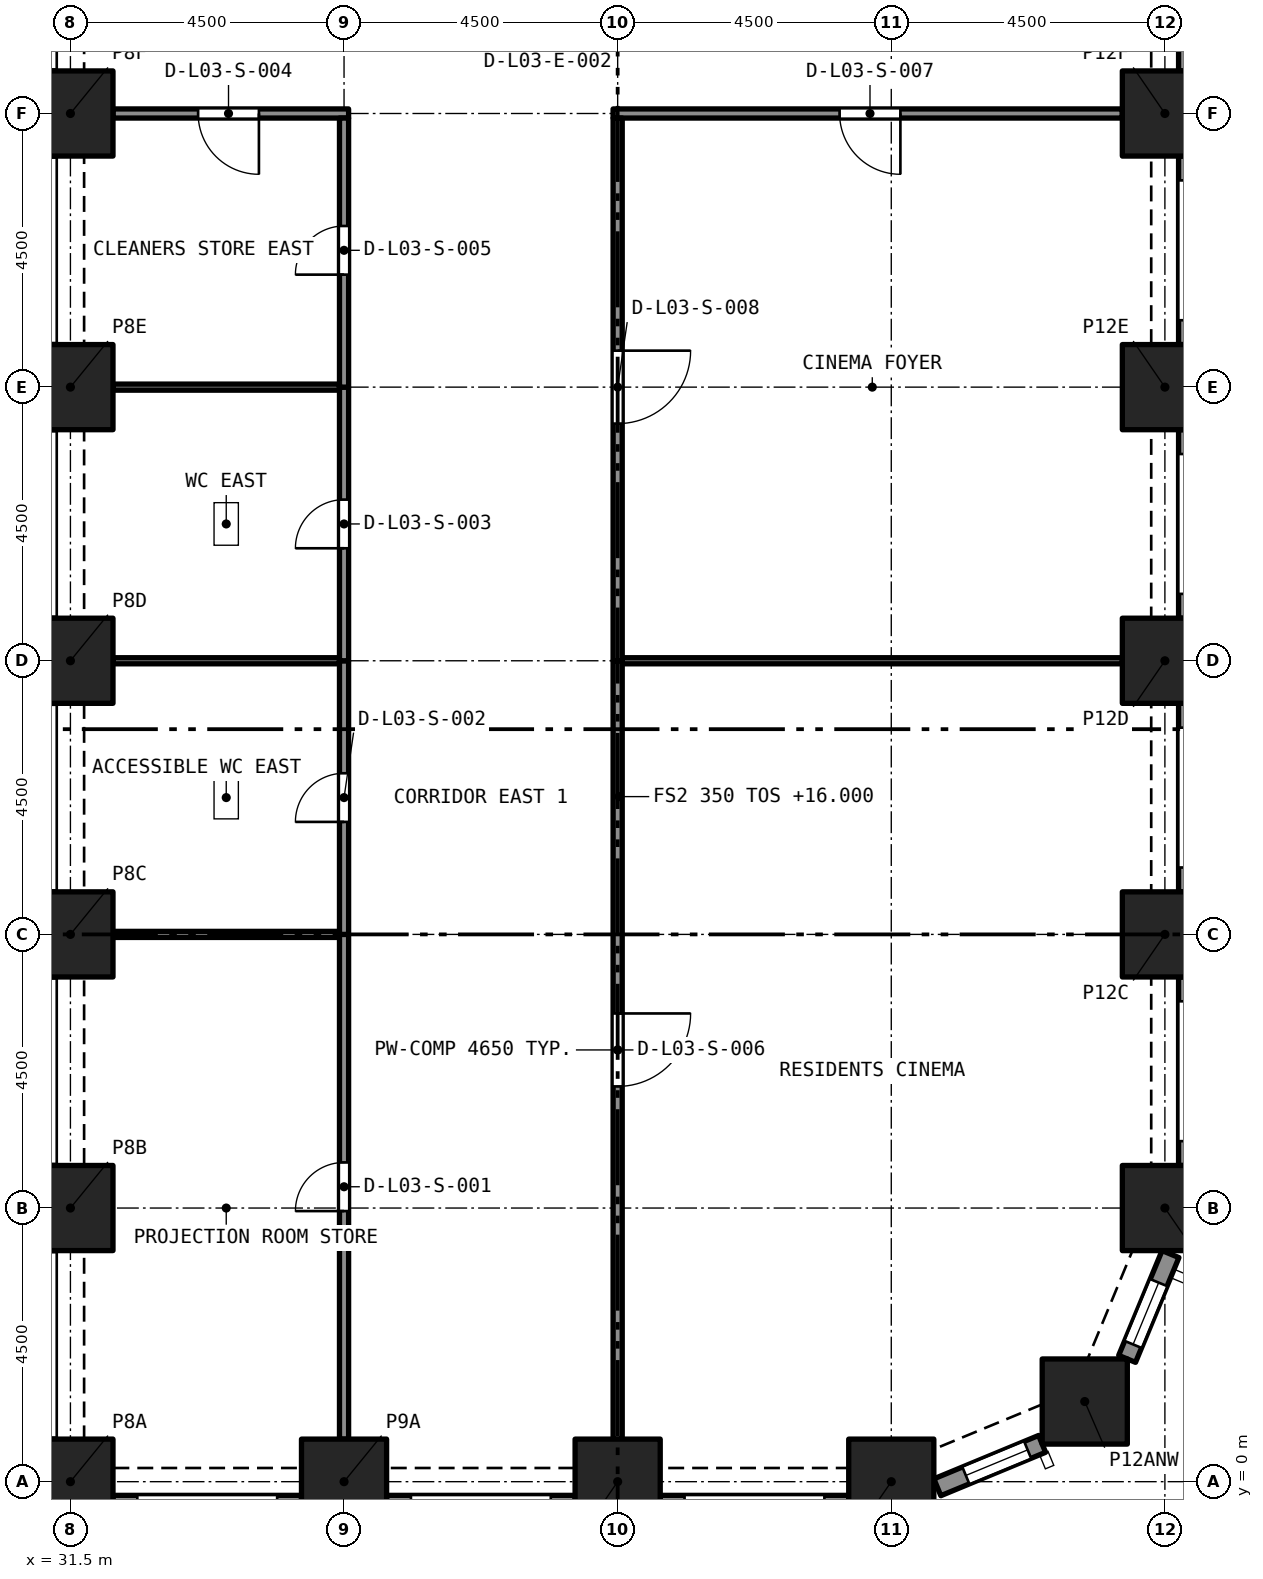
"""IFC4 building model, lengths in metres.
Left out: names, types, materials, properties, quantities, classifications, styles, units other than length and angle.
Written with IfcOpenShell. Run it as: python <this file> out.ifc"""

import sys

from ifc_helpers import new_model, si_unit, direction, frame, frame_2d, origin, origin_2d, place, context, subcontext, project, spatial, rectangle, extrude, element, fill, save


model = new_model("IFC4")
c1 = context("Model", 3, precision=1e-05, world=origin(), true_north=direction((0.0, 1.0)))
c2 = subcontext(c1, "Body", "Model", "MODEL_VIEW")
j1 = project(units=[si_unit("LENGTHUNIT", "METRE"), si_unit("PLANEANGLEUNIT", "RADIAN")], contexts=[c1])
p1 = place(None, origin())
s1 = spatial("IfcSite", under=j1, at=p1, CompositionType="ELEMENT")
p2 = place(p1, origin())
s2 = spatial("IfcBuilding", under=s1, at=p2, CompositionType="ELEMENT")
p3 = place(p2, frame((0.0, 0.0, 16.0)))
s3 = spatial("IfcBuildingStorey", under=s2, at=p3, CompositionType="ELEMENT", Elevation=16.0)
for number, where, z_axis, x_axis in (
    (1, (31.5, 0.0, 0.0), (0.0, 0.0, 1.0), (1.0, 0.0, 0.0)),
    (2, (36.0, 0.0, 0.0), (0.0, 0.0, 1.0), (1.0, 0.0, 0.0)),
    (3, (40.5, 0.0, 0.0), (0.0, 0.0, 1.0), (1.0, 0.0, 0.0)),
    (4, (45.0, 0.0, 0.0), (0.0, 0.0, 1.0), (1.0, 0.0, 0.0)),
    (5, (48.182, 1.318, 0.0), (0.0, 0.0, 1.0), (1.0, 0.0, 0.0)),
    (6, (31.5, 4.5, 0.0), (0.0, 0.0, 1.0), (1.0, 0.0, 0.0)),
    (7, (49.5, 4.5, 0.0), (0.0, 0.0, 1.0), (1.0, 0.0, 0.0)),
    (8, (31.5, 9.0, 0.0), (0.0, 0.0, 1.0), (1.0, 0.0, 0.0)),
    (9, (49.5, 9.0, 0.0), (0.0, 0.0, 1.0), (1.0, 0.0, 0.0)),
    (10, (31.5, 13.5, 0.0), (0.0, 0.0, 1.0), (1.0, 0.0, 0.0)),
    (11, (49.5, 13.5, 0.0), (0.0, 0.0, 1.0), (1.0, 0.0, 0.0)),
    (12, (31.5, 18.0, 0.0), (0.0, 0.0, 1.0), (1.0, 0.0, 0.0)),
    (13, (49.5, 18.0, 0.0), (0.0, 0.0, 1.0), (1.0, 0.0, 0.0)),
    (14, (31.5, 22.5, 0.0), (0.0, 0.0, 1.0), (1.0, 0.0, 0.0)),
    (15, (49.5, 22.5, 0.0), (0.0, 0.0, 1.0), (1.0, 0.0, 0.0)),
):
    element("IfcColumn", number, at=place(p3, frame(where, z_axis=z_axis, x_axis=x_axis)), inside=s3, PredefinedType="COLUMN", context=c2, shape_type="SweptSolid", body=[
        extrude(rectangle(XDim=1.4, YDim=1.4, at=origin_2d()), origin(), (0.0, 0.0, 1.0), 5.0),
    ])
p4 = place(p3, frame((35.3, -0.375, 0.0), z_axis=(0.0, 0.0, 1.0), x_axis=(-1.0, 0.0, 0.0)))
e16 = element("IfcWall", 16, at=p4, inside=s3, PredefinedType="SOLIDWALL", context=c2, shape_type="SweptSolid", body=[
    extrude(rectangle(XDim=3.1, YDim=0.3, at=frame_2d((1.55, 0.0))), origin(), (0.0, 0.0, 1.0), 5.0),
])
p5 = place(p4, frame((0.4, 0.0, 0.45)))
e17 = element("IfcOpeningElement", 17, at=p5, cuts=e16, PredefinedType="OPENING", context=c2, shape_type="SweptSolid", body=[
    extrude(rectangle(XDim=2.3, YDim=3.3, at=frame_2d((1.15, 1.65))), frame((0.0, 0.16, 0.0), z_axis=(0.0, -1.0, 0.0), x_axis=(1.0, 0.0, 0.0)), (0.0, 0.0, 1.0), 0.32),
])
p6 = place(p3, frame((39.8, -0.375, 0.0), z_axis=(0.0, 0.0, 1.0), x_axis=(-1.0, 0.0, 0.0)))
e18 = element("IfcWall", 18, at=p6, inside=s3, PredefinedType="SOLIDWALL", context=c2, shape_type="SweptSolid", body=[
    extrude(rectangle(XDim=3.1, YDim=0.3, at=frame_2d((1.55, 0.0))), origin(), (0.0, 0.0, 1.0), 5.0),
])
p7 = place(p6, frame((0.4, 0.0, 0.45)))
e19 = element("IfcOpeningElement", 19, at=p7, cuts=e18, PredefinedType="OPENING", context=c2, shape_type="SweptSolid", body=[
    extrude(rectangle(XDim=2.3, YDim=3.3, at=frame_2d((1.15, 1.65))), frame((0.0, 0.16, 0.0), z_axis=(0.0, -1.0, 0.0), x_axis=(1.0, 0.0, 0.0)), (0.0, 0.0, 1.0), 0.32),
])
p8 = place(p3, frame((44.3, -0.375, 0.0), z_axis=(0.0, 0.0, 1.0), x_axis=(-1.0, 0.0, 0.0)))
e20 = element("IfcWall", 20, at=p8, inside=s3, PredefinedType="SOLIDWALL", context=c2, shape_type="SweptSolid", body=[
    extrude(rectangle(XDim=3.1, YDim=0.3, at=frame_2d((1.55, 0.0))), origin(), (0.0, 0.0, 1.0), 5.0),
])
p9 = place(p8, frame((0.4, 0.0, 0.45)))
e21 = element("IfcOpeningElement", 21, at=p9, cuts=e20, PredefinedType="OPENING", context=c2, shape_type="SweptSolid", body=[
    extrude(rectangle(XDim=2.3, YDim=3.3, at=frame_2d((1.15, 1.65))), frame((0.0, 0.16, 0.0), z_axis=(0.0, -1.0, 0.0), x_axis=(1.0, 0.0, 0.0)), (0.0, 0.0, 1.0), 0.32),
])
p10 = place(p3, frame((47.48, 0.622, 0.0), z_axis=(0.0, 0.0, 1.0), x_axis=(-0.923903565336, -0.38262540684, 0.0)))
e22 = element("IfcWall", 22, at=p10, inside=s3, PredefinedType="SOLIDWALL", context=c2, shape_type="SweptSolid", body=[
    extrude(rectangle(XDim=1.865, YDim=0.3, at=frame_2d((0.933, 0.0))), origin(), (0.0, 0.0, 1.0), 5.0),
])
p11 = place(p10, frame((0.258, 0.0, 0.45)))
e23 = element("IfcOpeningElement", 23, at=p11, cuts=e22, PredefinedType="OPENING", context=c2, shape_type="SweptSolid", body=[
    extrude(rectangle(XDim=1.1, YDim=3.3, at=frame_2d((0.55, 1.65))), frame((0.0, 0.16, 0.0), z_axis=(0.0, -1.0, 0.0), x_axis=(1.0, 0.0, 0.0)), (0.0, 0.0, 1.0), 0.32),
])
p12 = place(p3, frame((49.592, 3.743, 0.0), z_axis=(0.0, 0.0, 1.0), x_axis=(-0.382737135771, -0.923857286003, 0.0)))
e24 = element("IfcWall", 24, at=p12, inside=s3, PredefinedType="SOLIDWALL", context=c2, shape_type="SweptSolid", body=[
    extrude(rectangle(XDim=1.865, YDim=0.3, at=frame_2d((0.933, 0.0))), origin(), (0.0, 0.0, 1.0), 5.0),
])
p13 = place(p12, frame((0.508, 0.0, 0.45)))
e25 = element("IfcOpeningElement", 25, at=p13, cuts=e24, PredefinedType="OPENING", context=c2, shape_type="SweptSolid", body=[
    extrude(rectangle(XDim=1.1, YDim=3.3, at=frame_2d((0.55, 1.65))), frame((0.0, 0.16, 0.0), z_axis=(0.0, -1.0, 0.0), x_axis=(1.0, 0.0, 0.0)), (0.0, 0.0, 1.0), 0.32),
])
p14 = place(p3, frame((49.875, 8.3, 0.0), z_axis=(0.0, 0.0, 1.0), x_axis=(0.0, -1.0, 0.0)))
e26 = element("IfcWall", 26, at=p14, inside=s3, PredefinedType="SOLIDWALL", context=c2, shape_type="SweptSolid", body=[
    extrude(rectangle(XDim=3.1, YDim=0.3, at=frame_2d((1.55, 0.0))), origin(), (0.0, 0.0, 1.0), 5.0),
])
p15 = place(p14, frame((0.4, 0.0, 0.45)))
e27 = element("IfcOpeningElement", 27, at=p15, cuts=e26, PredefinedType="OPENING", context=c2, shape_type="SweptSolid", body=[
    extrude(rectangle(XDim=2.3, YDim=3.3, at=frame_2d((1.15, 1.65))), frame((0.0, 0.16, 0.0), z_axis=(0.0, -1.0, 0.0), x_axis=(1.0, 0.0, 0.0)), (0.0, 0.0, 1.0), 0.32),
])
p16 = place(p3, frame((49.875, 12.8, 0.0), z_axis=(0.0, 0.0, 1.0), x_axis=(0.0, -1.0, 0.0)))
e28 = element("IfcWall", 28, at=p16, inside=s3, PredefinedType="SOLIDWALL", context=c2, shape_type="SweptSolid", body=[
    extrude(rectangle(XDim=3.1, YDim=0.3, at=frame_2d((1.55, 0.0))), origin(), (0.0, 0.0, 1.0), 5.0),
])
p17 = place(p16, frame((0.4, 0.0, 0.45)))
e29 = element("IfcOpeningElement", 29, at=p17, cuts=e28, PredefinedType="OPENING", context=c2, shape_type="SweptSolid", body=[
    extrude(rectangle(XDim=2.3, YDim=3.3, at=frame_2d((1.15, 1.65))), frame((0.0, 0.16, 0.0), z_axis=(0.0, -1.0, 0.0), x_axis=(1.0, 0.0, 0.0)), (0.0, 0.0, 1.0), 0.32),
])
p18 = place(p3, frame((49.875, 17.3, 0.0), z_axis=(0.0, 0.0, 1.0), x_axis=(0.0, -1.0, 0.0)))
e30 = element("IfcWall", 30, at=p18, inside=s3, PredefinedType="SOLIDWALL", context=c2, shape_type="SweptSolid", body=[
    extrude(rectangle(XDim=3.1, YDim=0.3, at=frame_2d((1.55, 0.0))), origin(), (0.0, 0.0, 1.0), 5.0),
])
p19 = place(p18, frame((0.4, 0.0, 0.45)))
e31 = element("IfcOpeningElement", 31, at=p19, cuts=e30, PredefinedType="OPENING", context=c2, shape_type="SweptSolid", body=[
    extrude(rectangle(XDim=2.3, YDim=3.3, at=frame_2d((1.15, 1.65))), frame((0.0, 0.16, 0.0), z_axis=(0.0, -1.0, 0.0), x_axis=(1.0, 0.0, 0.0)), (0.0, 0.0, 1.0), 0.32),
])
p20 = place(p3, frame((49.875, 21.8, 0.0), z_axis=(0.0, 0.0, 1.0), x_axis=(0.0, -1.0, 0.0)))
e32 = element("IfcWall", 32, at=p20, inside=s3, PredefinedType="SOLIDWALL", context=c2, shape_type="SweptSolid", body=[
    extrude(rectangle(XDim=3.1, YDim=0.3, at=frame_2d((1.55, 0.0))), origin(), (0.0, 0.0, 1.0), 5.0),
])
p21 = place(p20, frame((0.4, 0.0, 0.45)))
e33 = element("IfcOpeningElement", 33, at=p21, cuts=e32, PredefinedType="OPENING", context=c2, shape_type="SweptSolid", body=[
    extrude(rectangle(XDim=2.3, YDim=3.3, at=frame_2d((1.15, 1.65))), frame((0.0, 0.16, 0.0), z_axis=(0.0, -1.0, 0.0), x_axis=(1.0, 0.0, 0.0)), (0.0, 0.0, 1.0), 0.32),
])
p22 = place(p3, frame((49.875, 26.3, 0.0), z_axis=(0.0, 0.0, 1.0), x_axis=(0.0, -1.0, 0.0)))
e34 = element("IfcWall", 34, at=p22, inside=s3, PredefinedType="SOLIDWALL", context=c2, shape_type="SweptSolid", body=[
    extrude(rectangle(XDim=3.1, YDim=0.3, at=frame_2d((1.55, 0.0))), origin(), (0.0, 0.0, 1.0), 5.0),
])
p23 = place(p22, frame((0.4, 0.0, 0.45)))
e35 = element("IfcOpeningElement", 35, at=p23, cuts=e34, PredefinedType="OPENING", context=c2, shape_type="SweptSolid", body=[
    extrude(rectangle(XDim=2.3, YDim=3.3, at=frame_2d((1.15, 1.65))), frame((0.0, 0.16, 0.0), z_axis=(0.0, -1.0, 0.0), x_axis=(1.0, 0.0, 0.0)), (0.0, 0.0, 1.0), 0.32),
])
p24 = place(p3, frame((32.2, 9.0, 0.0), z_axis=(0.0, 0.0, 1.0), x_axis=(1.0, 0.0, 0.0)))
e36 = element("IfcWall", 36, at=p24, inside=s3, PredefinedType="PARTITIONING", context=c2, shape_type="SweptSolid", body=[
    extrude(rectangle(XDim=3.725, YDim=0.1, at=frame_2d((1.863, 0.0))), origin(), (0.0, 0.0, 1.0), 4.65),
])
p25 = place(p3, frame((36.0, 0.7, 0.0), z_axis=(0.0, 0.0, 1.0), x_axis=(0.0, 1.0, 0.0)))
e37 = element("IfcWall", 37, at=p25, inside=s3, PredefinedType="PARTITIONING", context=c2, shape_type="SweptSolid", body=[
    extrude(rectangle(XDim=8.3, YDim=0.15, at=frame_2d((4.15, 0.0))), origin(), (0.0, 0.0, 1.0), 4.65),
])
p26 = place(p25, frame((3.75, 0.0, 0.0)))
e38 = element("IfcOpeningElement", 38, at=p26, cuts=e37, PredefinedType="OPENING", context=c2, shape_type="SweptSolid", body=[
    extrude(rectangle(XDim=0.8, YDim=2.1, at=frame_2d((0.4, 1.05))), frame((0.0, 0.085, 0.0), z_axis=(0.0, -1.0, 0.0), x_axis=(1.0, 0.0, 0.0)), (0.0, 0.0, 1.0), 0.17),
])
p27 = place(p3, frame((32.2, 13.5, 0.0), z_axis=(0.0, 0.0, 1.0), x_axis=(1.0, 0.0, 0.0)))
e39 = element("IfcWall", 39, at=p27, inside=s3, PredefinedType="PARTITIONING", context=c2, shape_type="SweptSolid", body=[
    extrude(rectangle(XDim=3.725, YDim=0.1, at=frame_2d((1.863, 0.0))), origin(), (0.0, 0.0, 1.0), 4.65),
])
p28 = place(p3, frame((36.0, 9.0, 0.0), z_axis=(0.0, 0.0, 1.0), x_axis=(0.0, 1.0, 0.0)))
e40 = element("IfcWall", 40, at=p28, inside=s3, PredefinedType="PARTITIONING", context=c2, shape_type="SweptSolid", body=[
    extrude(rectangle(XDim=4.5, YDim=0.15, at=frame_2d((2.25, 0.0))), origin(), (0.0, 0.0, 1.0), 4.65),
])
p29 = place(p28, frame((1.85, 0.0, 0.0)))
e41 = element("IfcOpeningElement", 41, at=p29, cuts=e40, PredefinedType="OPENING", context=c2, shape_type="SweptSolid", body=[
    extrude(rectangle(XDim=0.8, YDim=2.1, at=frame_2d((0.4, 1.05))), frame((0.0, 0.085, 0.0), z_axis=(0.0, -1.0, 0.0), x_axis=(1.0, 0.0, 0.0)), (0.0, 0.0, 1.0), 0.17),
])
p30 = place(p3, frame((32.2, 18.0, 0.0), z_axis=(0.0, 0.0, 1.0), x_axis=(1.0, 0.0, 0.0)))
e42 = element("IfcWall", 42, at=p30, inside=s3, PredefinedType="PARTITIONING", context=c2, shape_type="SweptSolid", body=[
    extrude(rectangle(XDim=3.725, YDim=0.1, at=frame_2d((1.863, 0.0))), origin(), (0.0, 0.0, 1.0), 4.65),
])
p31 = place(p3, frame((36.0, 13.5, 0.0), z_axis=(0.0, 0.0, 1.0), x_axis=(0.0, 1.0, 0.0)))
e43 = element("IfcWall", 43, at=p31, inside=s3, PredefinedType="PARTITIONING", context=c2, shape_type="SweptSolid", body=[
    extrude(rectangle(XDim=4.5, YDim=0.15, at=frame_2d((2.25, 0.0))), origin(), (0.0, 0.0, 1.0), 4.65),
])
p32 = place(p31, frame((1.85, 0.0, 0.0)))
e44 = element("IfcOpeningElement", 44, at=p32, cuts=e43, PredefinedType="OPENING", context=c2, shape_type="SweptSolid", body=[
    extrude(rectangle(XDim=0.8, YDim=2.1, at=frame_2d((0.4, 1.05))), frame((0.0, 0.085, 0.0), z_axis=(0.0, -1.0, 0.0), x_axis=(1.0, 0.0, 0.0)), (0.0, 0.0, 1.0), 0.17),
])
p33 = place(p3, frame((36.075, 22.5, 0.0), z_axis=(0.0, 0.0, 1.0), x_axis=(-1.0, 0.0, 0.0)))
e45 = element("IfcWall", 45, at=p33, inside=s3, PredefinedType="PARTITIONING", context=c2, shape_type="SweptSolid", body=[
    extrude(rectangle(XDim=3.875, YDim=0.15, at=frame_2d((1.938, 0.0))), origin(), (0.0, 0.0, 1.0), 4.65),
])
p34 = place(p33, frame((1.475, 0.0, 0.0)))
e46 = element("IfcOpeningElement", 46, at=p34, cuts=e45, PredefinedType="OPENING", context=c2, shape_type="SweptSolid", body=[
    extrude(rectangle(XDim=1.0, YDim=2.1, at=frame_2d((0.5, 1.05))), frame((0.0, 0.085, 0.0), z_axis=(0.0, -1.0, 0.0), x_axis=(1.0, 0.0, 0.0)), (0.0, 0.0, 1.0), 0.17),
])
p35 = place(p3, frame((36.0, 18.0, 0.0), z_axis=(0.0, 0.0, 1.0), x_axis=(0.0, 1.0, 0.0)))
e47 = element("IfcWall", 47, at=p35, inside=s3, PredefinedType="PARTITIONING", context=c2, shape_type="SweptSolid", body=[
    extrude(rectangle(XDim=4.425, YDim=0.15, at=frame_2d((2.212, 0.0))), origin(), (0.0, 0.0, 1.0), 4.65),
])
p36 = place(p35, frame((1.85, 0.0, 0.0)))
e48 = element("IfcOpeningElement", 48, at=p36, cuts=e47, PredefinedType="OPENING", context=c2, shape_type="SweptSolid", body=[
    extrude(rectangle(XDim=0.8, YDim=2.1, at=frame_2d((0.4, 1.05))), frame((0.0, 0.085, 0.0), z_axis=(0.0, -1.0, 0.0), x_axis=(1.0, 0.0, 0.0)), (0.0, 0.0, 1.0), 0.17),
])
p37 = place(p3, frame((40.575, 13.5, 0.0), z_axis=(0.0, 0.0, 1.0), x_axis=(1.0, 0.0, 0.0)))
e49 = element("IfcWall", 49, at=p37, inside=s3, PredefinedType="PARTITIONING", context=c2, shape_type="SweptSolid", body=[
    extrude(rectangle(XDim=8.225, YDim=0.1, at=frame_2d((4.113, 0.0))), origin(), (0.0, 0.0, 1.0), 4.65),
])
p38 = place(p3, frame((40.5, 13.5, 0.0), z_axis=(0.0, 0.0, 1.0), x_axis=(0.0, -1.0, 0.0)))
e50 = element("IfcWall", 50, at=p38, inside=s3, PredefinedType="PARTITIONING", context=c2, shape_type="SweptSolid", body=[
    extrude(rectangle(XDim=12.8, YDim=0.15, at=frame_2d((6.4, 0.0))), origin(), (0.0, 0.0, 1.0), 4.65),
])
p39 = place(p38, frame((5.8, 0.0, 0.0)))
e51 = element("IfcOpeningElement", 51, at=p39, cuts=e50, PredefinedType="OPENING", context=c2, shape_type="SweptSolid", body=[
    extrude(rectangle(XDim=1.2, YDim=2.1, at=frame_2d((0.6, 1.05))), frame((0.0, 0.085, 0.0), z_axis=(0.0, -1.0, 0.0), x_axis=(1.0, 0.0, 0.0)), (0.0, 0.0, 1.0), 0.17),
])
p40 = place(p3, frame((48.8, 22.5, 0.0), z_axis=(0.0, 0.0, 1.0), x_axis=(-1.0, 0.0, 0.0)))
e52 = element("IfcWall", 52, at=p40, inside=s3, PredefinedType="PARTITIONING", context=c2, shape_type="SweptSolid", body=[
    extrude(rectangle(XDim=8.375, YDim=0.15, at=frame_2d((4.188, 0.0))), origin(), (0.0, 0.0, 1.0), 4.65),
])
p41 = place(p40, frame((3.65, 0.0, 0.0)))
e53 = element("IfcOpeningElement", 53, at=p41, cuts=e52, PredefinedType="OPENING", context=c2, shape_type="SweptSolid", body=[
    extrude(rectangle(XDim=1.0, YDim=2.1, at=frame_2d((0.5, 1.05))), frame((0.0, 0.085, 0.0), z_axis=(0.0, -1.0, 0.0), x_axis=(1.0, 0.0, 0.0)), (0.0, 0.0, 1.0), 0.17),
])
p42 = place(p3, frame((40.5, 22.425, 0.0), z_axis=(0.0, 0.0, 1.0), x_axis=(0.0, -1.0, 0.0)))
e54 = element("IfcWall", 54, at=p42, inside=s3, PredefinedType="PARTITIONING", context=c2, shape_type="SweptSolid", body=[
    extrude(rectangle(XDim=8.925, YDim=0.15, at=frame_2d((4.462, 0.0))), origin(), (0.0, 0.0, 1.0), 4.65),
])
p43 = place(p42, frame((3.825, 0.0, 0.0)))
e55 = element("IfcOpeningElement", 55, at=p43, cuts=e54, PredefinedType="OPENING", context=c2, shape_type="SweptSolid", body=[
    extrude(rectangle(XDim=1.2, YDim=2.1, at=frame_2d((0.6, 1.05))), frame((0.0, 0.085, 0.0), z_axis=(0.0, -1.0, 0.0), x_axis=(1.0, 0.0, 0.0)), (0.0, 0.0, 1.0), 0.17),
])
p44 = place(p11, origin())
e56 = element("IfcWindow", 56, at=p44, inside=s3, PartitioningType="SINGLE_PANEL", PredefinedType="WINDOW", context=c2, shape_type="SweptSolid", body=[
    extrude(rectangle(XDim=1.1, YDim=3.3, at=frame_2d((0.55, 1.65))), frame((0.0, 0.03, 0.0), z_axis=(0.0, -1.0, 0.0), x_axis=(1.0, 0.0, 0.0)), (0.0, 0.0, 1.0), 0.06),
])
fill(e23, e56)
p45 = place(p13, origin())
e57 = element("IfcWindow", 57, at=p45, inside=s3, PartitioningType="SINGLE_PANEL", PredefinedType="WINDOW", context=c2, shape_type="SweptSolid", body=[
    extrude(rectangle(XDim=1.1, YDim=3.3, at=frame_2d((0.55, 1.65))), frame((0.0, 0.03, 0.0), z_axis=(0.0, -1.0, 0.0), x_axis=(1.0, 0.0, 0.0)), (0.0, 0.0, 1.0), 0.06),
])
fill(e25, e57)
p46 = place(p26, origin())
e58 = element("IfcDoor", 58, at=p46, inside=s3, OperationType="SINGLE_SWING_LEFT", PredefinedType="DOOR", context=c2, shape_type="SweptSolid", body=[
    extrude(rectangle(XDim=0.8, YDim=2.1, at=frame_2d((0.4, 1.05))), frame((0.0, 0.025, 0.0), z_axis=(0.0, -1.0, 0.0), x_axis=(1.0, 0.0, 0.0)), (0.0, 0.0, 1.0), 0.05),
])
fill(e38, e58)
p47 = place(p29, origin())
e59 = element("IfcDoor", 59, at=p47, inside=s3, OperationType="SINGLE_SWING_RIGHT", PredefinedType="DOOR", context=c2, shape_type="SweptSolid", body=[
    extrude(rectangle(XDim=0.8, YDim=2.1, at=frame_2d((0.4, 1.05))), frame((0.0, 0.025, 0.0), z_axis=(0.0, -1.0, 0.0), x_axis=(1.0, 0.0, 0.0)), (0.0, 0.0, 1.0), 0.05),
])
fill(e41, e59)
p48 = place(p32, origin())
e60 = element("IfcDoor", 60, at=p48, inside=s3, OperationType="SINGLE_SWING_RIGHT", PredefinedType="DOOR", context=c2, shape_type="SweptSolid", body=[
    extrude(rectangle(XDim=0.8, YDim=2.1, at=frame_2d((0.4, 1.05))), frame((0.0, 0.025, 0.0), z_axis=(0.0, -1.0, 0.0), x_axis=(1.0, 0.0, 0.0)), (0.0, 0.0, 1.0), 0.05),
])
fill(e44, e60)
p49 = place(p34, origin())
e61 = element("IfcDoor", 61, at=p49, inside=s3, OperationType="SINGLE_SWING_RIGHT", PredefinedType="DOOR", context=c2, shape_type="SweptSolid", body=[
    extrude(rectangle(XDim=1.0, YDim=2.1, at=frame_2d((0.5, 1.05))), frame((0.0, 0.025, 0.0), z_axis=(0.0, -1.0, 0.0), x_axis=(1.0, 0.0, 0.0)), (0.0, 0.0, 1.0), 0.05),
])
fill(e46, e61)
p50 = place(p36, origin())
e62 = element("IfcDoor", 62, at=p50, inside=s3, OperationType="SINGLE_SWING_RIGHT", PredefinedType="DOOR", context=c2, shape_type="SweptSolid", body=[
    extrude(rectangle(XDim=0.8, YDim=2.1, at=frame_2d((0.4, 1.05))), frame((0.0, 0.025, 0.0), z_axis=(0.0, -1.0, 0.0), x_axis=(1.0, 0.0, 0.0)), (0.0, 0.0, 1.0), 0.05),
])
fill(e48, e62)
p51 = place(p39, origin())
e63 = element("IfcDoor", 63, at=p51, inside=s3, OperationType="SINGLE_SWING_RIGHT", PredefinedType="DOOR", context=c2, shape_type="SweptSolid", body=[
    extrude(rectangle(XDim=1.2, YDim=2.1, at=frame_2d((0.6, 1.05))), frame((0.0, 0.025, 0.0), z_axis=(0.0, -1.0, 0.0), x_axis=(1.0, 0.0, 0.0)), (0.0, 0.0, 1.0), 0.05),
])
fill(e51, e63)
p52 = place(p41, origin())
e64 = element("IfcDoor", 64, at=p52, inside=s3, OperationType="SINGLE_SWING_LEFT", PredefinedType="DOOR", context=c2, shape_type="SweptSolid", body=[
    extrude(rectangle(XDim=1.0, YDim=2.1, at=frame_2d((0.5, 1.05))), frame((0.0, 0.025, 0.0), z_axis=(0.0, -1.0, 0.0), x_axis=(1.0, 0.0, 0.0)), (0.0, 0.0, 1.0), 0.05),
])
fill(e53, e64)
p53 = place(p43, origin())
e65 = element("IfcDoor", 65, at=p53, inside=s3, OperationType="SINGLE_SWING_LEFT", PredefinedType="DOOR", context=c2, shape_type="SweptSolid", body=[
    extrude(rectangle(XDim=1.2, YDim=2.1, at=frame_2d((0.6, 1.05))), frame((0.0, 0.025, 0.0), z_axis=(0.0, -1.0, 0.0), x_axis=(1.0, 0.0, 0.0)), (0.0, 0.0, 1.0), 0.05),
])
fill(e55, e65)
save(model, sys.argv[1])
